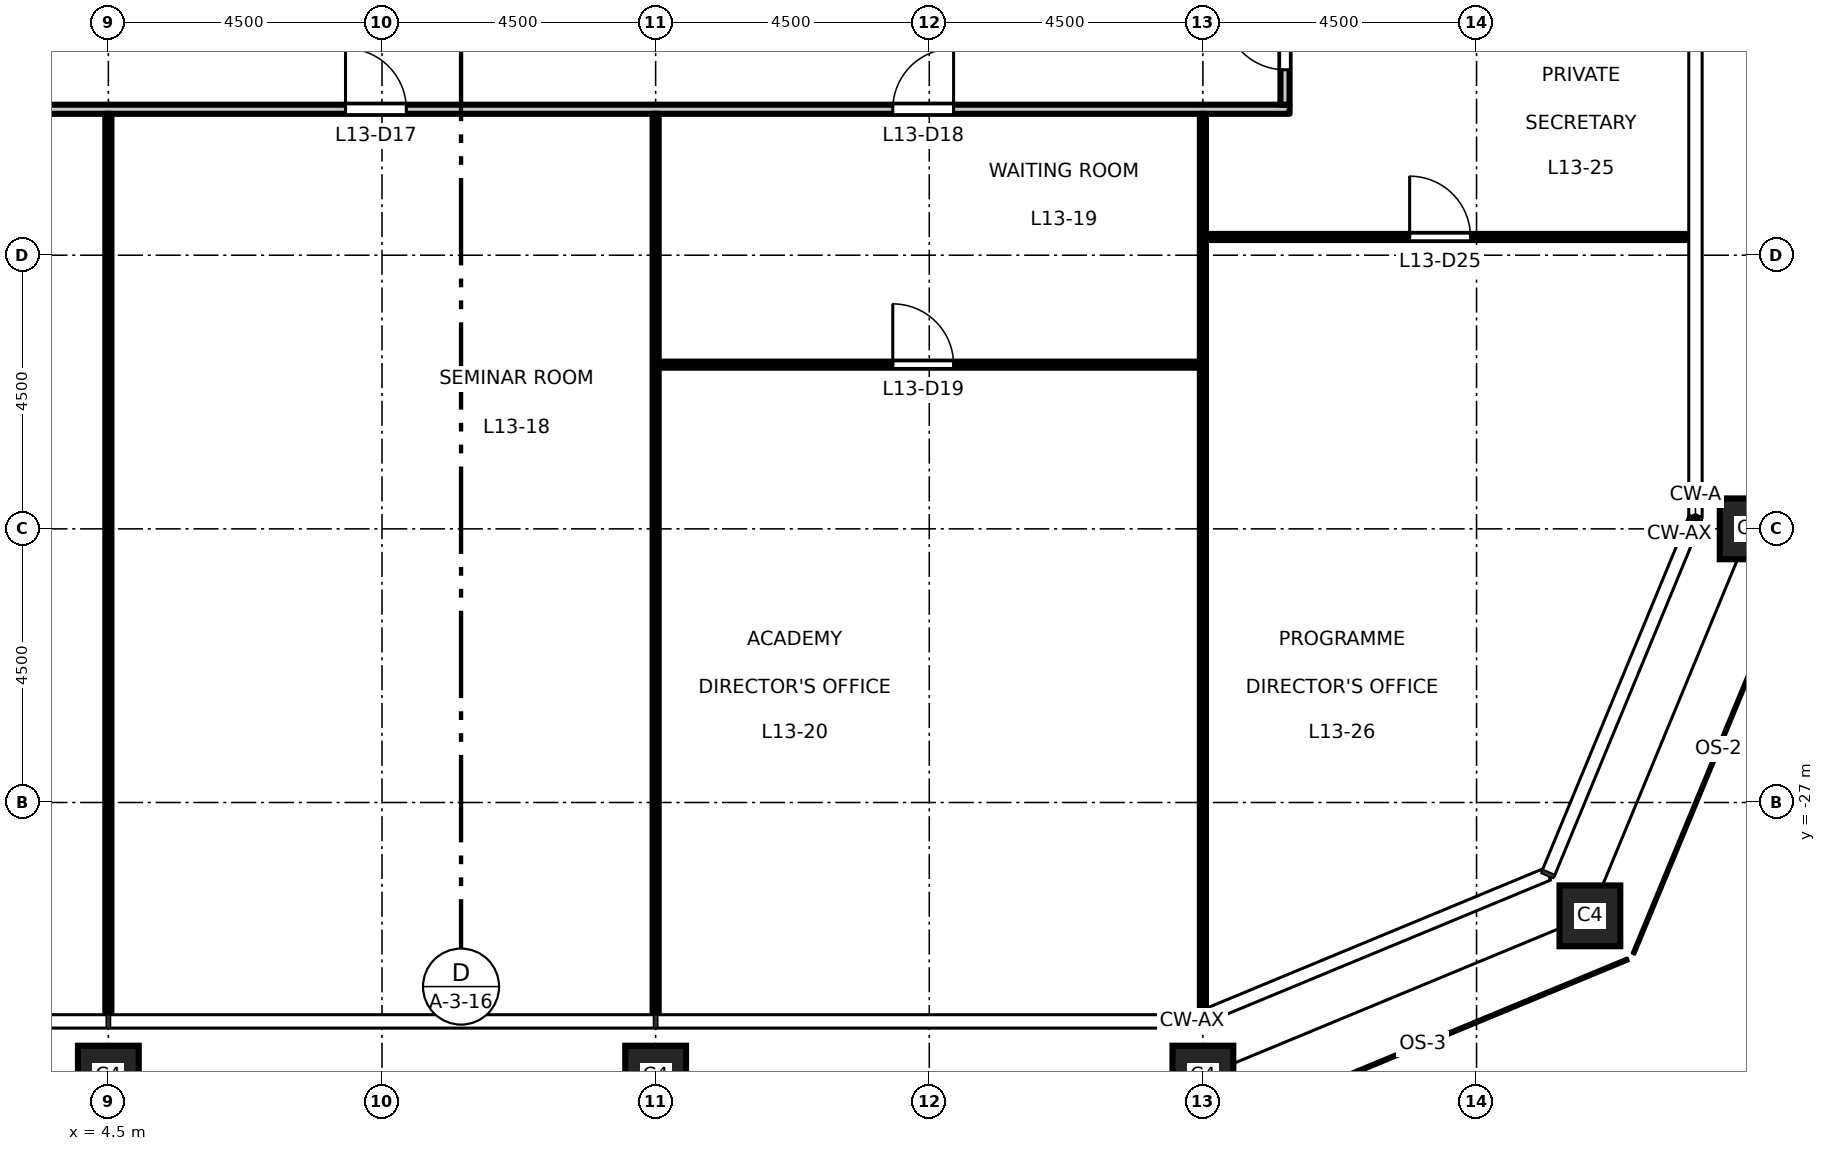
"""IFC4 building model, lengths in metres.
Left out: names, types, materials, properties, quantities, classifications, styles, units other than length and angle.
Written with IfcOpenShell. Run it as: python <this file> out.ifc"""

import sys

from ifc_helpers import new_model, si_unit, direction, frame, frame_2d, origin, origin_2d, place, context, subcontext, project, spatial, rectangle, hollow_rectangle, extrude, element, fill, save


model = new_model("IFC4")
c1 = context("Model", 3, precision=1e-05, world=origin(), true_north=direction((0.0, 1.0)))
c2 = subcontext(c1, "Body", "Model", "MODEL_VIEW")
j1 = project(units=[si_unit("LENGTHUNIT", "METRE"), si_unit("PLANEANGLEUNIT", "RADIAN")], contexts=[c1])
p1 = place(None, origin())
s1 = spatial("IfcSite", under=j1, at=p1, CompositionType="ELEMENT")
p2 = place(p1, origin())
s2 = spatial("IfcBuilding", under=s1, at=p2, CompositionType="ELEMENT")
p3 = place(p2, frame((0.0, 0.0, 62.7)))
s3 = spatial("IfcBuildingStorey", under=s2, at=p3, CompositionType="ELEMENT", Elevation=62.7)
for number, where, z_axis, x_axis in (
    (1, (4.5, -31.5, 0.0), (0.0, 0.0, 1.0), (1.0, 0.0, 0.0)),
    (2, (13.5, -31.5, 0.0), (0.0, 0.0, 1.0), (1.0, 0.0, 0.0)),
    (3, (22.5, -31.5, 0.0), (0.0, 0.0, 1.0), (1.0, 0.0, 0.0)),
    (4, (28.864, -28.864, 0.0), (0.0, 0.0, 1.0), (1.0, 0.0, 0.0)),
    (5, (31.5, -22.5, 0.0), (0.0, 0.0, 1.0), (1.0, 0.0, 0.0)),
):
    element("IfcColumn", number, at=place(p3, frame(where, z_axis=z_axis, x_axis=x_axis)), inside=s3, PredefinedType="COLUMN", context=c2, shape_type="SweptSolid", body=[
        extrude(hollow_rectangle(XDim=1.0, YDim=1.0, WallThickness=0.06, at=origin_2d()), origin(), (0.0, 0.0, 1.0), 4.5),
    ])
p4 = place(p3, frame((13.55, -19.8, 0.0), z_axis=(0.0, 0.0, 1.0), x_axis=(1.0, 0.0, 0.0)))
e6 = element("IfcWall", 6, at=p4, inside=s3, PredefinedType="PARTITIONING", context=c2, shape_type="SweptSolid", body=[
    extrude(rectangle(XDim=8.9, YDim=0.1, at=frame_2d((4.45, 0.0))), origin(), (0.0, 0.0, 1.0), 4.35),
])
p5 = place(p4, frame((3.85, 0.0, 0.0)))
e7 = element("IfcOpeningElement", 7, at=p5, cuts=e6, PredefinedType="OPENING", context=c2, shape_type="SweptSolid", body=[
    extrude(rectangle(XDim=1.0, YDim=2.1, at=frame_2d((0.5, 1.05))), frame((0.0, 0.06, 0.0), z_axis=(0.0, -1.0, 0.0), x_axis=(1.0, 0.0, 0.0)), (0.0, 0.0, 1.0), 0.12),
])
p6 = place(p3, frame((22.55, -17.7, 0.0), z_axis=(0.0, 0.0, 1.0), x_axis=(1.0, 0.0, 0.0)))
e8 = element("IfcWall", 8, at=p6, inside=s3, PredefinedType="PARTITIONING", context=c2, shape_type="SweptSolid", body=[
    extrude(rectangle(XDim=7.96, YDim=0.1, at=frame_2d((3.98, 0.0))), origin(), (0.0, 0.0, 1.0), 4.35),
])
p7 = place(p6, frame((3.35, 0.0, 0.0)))
e9 = element("IfcOpeningElement", 9, at=p7, cuts=e8, PredefinedType="OPENING", context=c2, shape_type="SweptSolid", body=[
    extrude(rectangle(XDim=1.0, YDim=2.1, at=frame_2d((0.5, 1.05))), frame((0.0, 0.06, 0.0), z_axis=(0.0, -1.0, 0.0), x_axis=(1.0, 0.0, 0.0)), (0.0, 0.0, 1.0), 0.12),
])
p8 = place(p3, frame((-23.925, -15.6, 0.0), z_axis=(0.0, 0.0, 1.0), x_axis=(1.0, 0.0, 0.0)))
e10 = element("IfcWall", 10, at=p8, inside=s3, PredefinedType="PARTITIONING", context=c2, shape_type="SweptSolid", body=[
    extrude(rectangle(XDim=47.85, YDim=0.15, at=frame_2d((23.925, 0.0))), origin(), (0.0, 0.0, 1.0), 4.35),
])
p9 = place(p8, frame((5.325, 0.0, 0.0)))
e11 = element("IfcOpeningElement", 11, at=p9, cuts=e10, PredefinedType="OPENING", context=c2, shape_type="SweptSolid", body=[
    extrude(rectangle(XDim=1.0, YDim=2.1, at=frame_2d((0.5, 1.05))), frame((0.0, 0.085, 0.0), z_axis=(0.0, -1.0, 0.0), x_axis=(1.0, 0.0, 0.0)), (0.0, 0.0, 1.0), 0.17),
])
p10 = place(p8, frame((14.325, 0.0, 0.0)))
e12 = element("IfcOpeningElement", 12, at=p10, cuts=e10, PredefinedType="OPENING", context=c2, shape_type="SweptSolid", body=[
    extrude(rectangle(XDim=1.0, YDim=2.1, at=frame_2d((0.5, 1.05))), frame((0.0, 0.085, 0.0), z_axis=(0.0, -1.0, 0.0), x_axis=(1.0, 0.0, 0.0)), (0.0, 0.0, 1.0), 0.17),
])
p11 = place(p8, frame((23.325, 0.0, 0.0)))
e13 = element("IfcOpeningElement", 13, at=p11, cuts=e10, PredefinedType="OPENING", context=c2, shape_type="SweptSolid", body=[
    extrude(rectangle(XDim=1.0, YDim=2.1, at=frame_2d((0.5, 1.05))), frame((0.0, 0.085, 0.0), z_axis=(0.0, -1.0, 0.0), x_axis=(1.0, 0.0, 0.0)), (0.0, 0.0, 1.0), 0.17),
])
p12 = place(p8, frame((32.325, 0.0, 0.0)))
e14 = element("IfcOpeningElement", 14, at=p12, cuts=e10, PredefinedType="OPENING", context=c2, shape_type="SweptSolid", body=[
    extrude(rectangle(XDim=1.0, YDim=2.1, at=frame_2d((0.5, 1.05))), frame((0.0, 0.085, 0.0), z_axis=(0.0, -1.0, 0.0), x_axis=(1.0, 0.0, 0.0)), (0.0, 0.0, 1.0), 0.17),
])
p13 = place(p8, frame((41.325, 0.0, 0.0)))
e15 = element("IfcOpeningElement", 15, at=p13, cuts=e10, PredefinedType="OPENING", context=c2, shape_type="SweptSolid", body=[
    extrude(rectangle(XDim=1.0, YDim=2.1, at=frame_2d((0.5, 1.05))), frame((0.0, 0.085, 0.0), z_axis=(0.0, -1.0, 0.0), x_axis=(1.0, 0.0, 0.0)), (0.0, 0.0, 1.0), 0.17),
])
for number, where, z_axis, x_axis in (
    (16, (4.5, -30.51, 0.0), (0.0, 0.0, 1.0), (0.0, 1.0, 0.0)),
    (17, (13.5, -30.51, 0.0), (0.0, 0.0, 1.0), (0.0, 1.0, 0.0)),
):
    element("IfcWall", number, at=place(p3, frame(where, z_axis=z_axis, x_axis=x_axis)), inside=s3, PredefinedType="PARTITIONING", context=c2, shape_type="SweptSolid", body=[
        extrude(rectangle(XDim=14.835, YDim=0.1, at=frame_2d((7.417, 0.0))), origin(), (0.0, 0.0, 1.0), 3.35),
    ])
p14 = place(p3, frame((22.5, -30.428, 0.0), z_axis=(0.0, 0.0, 1.0), x_axis=(0.0, 1.0, 0.0)))
e18 = element("IfcWall", 18, at=p14, inside=s3, PredefinedType="PARTITIONING", context=c2, shape_type="SweptSolid", body=[
    extrude(rectangle(XDim=14.753, YDim=0.1, at=frame_2d((7.376, 0.0))), origin(), (0.0, 0.0, 1.0), 3.35),
])
p15 = place(p3, frame((23.85, -15.525, 0.0), z_axis=(0.0, 0.0, 1.0), x_axis=(0.0, 1.0, 0.0)))
e19 = element("IfcWall", 19, at=p15, inside=s3, PredefinedType="PARTITIONING", context=c2, shape_type="SweptSolid", body=[
    extrude(rectangle(XDim=31.05, YDim=0.15, at=frame_2d((15.525, 0.0))), origin(), (0.0, 0.0, 1.0), 4.35),
])
p16 = place(p15, frame((29.675, 0.0, 0.0)))
e20 = element("IfcOpeningElement", 20, at=p16, cuts=e19, PredefinedType="OPENING", context=c2, shape_type="SweptSolid", body=[
    extrude(rectangle(XDim=1.0, YDim=2.1, at=frame_2d((0.5, 1.05))), frame((0.0, 0.085, 0.0), z_axis=(0.0, -1.0, 0.0), x_axis=(1.0, 0.0, 0.0)), (0.0, 0.0, 1.0), 0.17),
])
p17 = place(p15, frame((0.575, 0.0, 0.0)))
e21 = element("IfcOpeningElement", 21, at=p17, cuts=e19, PredefinedType="OPENING", context=c2, shape_type="SweptSolid", body=[
    extrude(rectangle(XDim=1.0, YDim=2.1, at=frame_2d((0.5, 1.05))), frame((0.0, 0.085, 0.0), z_axis=(0.0, -1.0, 0.0), x_axis=(1.0, 0.0, 0.0)), (0.0, 0.0, 1.0), 0.17),
])
p18 = place(p15, frame((5.925, 0.0, 0.0)))
e22 = element("IfcOpeningElement", 22, at=p18, cuts=e19, PredefinedType="OPENING", context=c2, shape_type="SweptSolid", body=[
    extrude(rectangle(XDim=1.0, YDim=2.1, at=frame_2d((0.5, 1.05))), frame((0.0, 0.085, 0.0), z_axis=(0.0, -1.0, 0.0), x_axis=(1.0, 0.0, 0.0)), (0.0, 0.0, 1.0), 0.17),
])
p19 = place(p15, frame((14.925, 0.0, 0.0)))
e23 = element("IfcOpeningElement", 23, at=p19, cuts=e19, PredefinedType="OPENING", context=c2, shape_type="SweptSolid", body=[
    extrude(rectangle(XDim=1.0, YDim=2.1, at=frame_2d((0.5, 1.05))), frame((0.0, 0.085, 0.0), z_axis=(0.0, -1.0, 0.0), x_axis=(1.0, 0.0, 0.0)), (0.0, 0.0, 1.0), 0.17),
])
p20 = place(p15, frame((23.925, 0.0, 0.0)))
e24 = element("IfcOpeningElement", 24, at=p20, cuts=e19, PredefinedType="OPENING", context=c2, shape_type="SweptSolid", body=[
    extrude(rectangle(XDim=1.0, YDim=2.1, at=frame_2d((0.5, 1.05))), frame((0.0, 0.085, 0.0), z_axis=(0.0, -1.0, 0.0), x_axis=(1.0, 0.0, 0.0)), (0.0, 0.0, 1.0), 0.17),
])
p21 = place(p12, origin())
e25 = element("IfcDoor", 25, at=p21, inside=s3, OperationType="SINGLE_SWING_LEFT", PredefinedType="DOOR", context=c2, shape_type="SweptSolid", body=[
    extrude(rectangle(XDim=1.0, YDim=2.1, at=frame_2d((0.5, 1.05))), frame((0.0, 0.025, 0.0), z_axis=(0.0, -1.0, 0.0), x_axis=(1.0, 0.0, 0.0)), (0.0, 0.0, 1.0), 0.05),
])
fill(e14, e25)
p22 = place(p13, origin())
e26 = element("IfcDoor", 26, at=p22, inside=s3, OperationType="SINGLE_SWING_RIGHT", PredefinedType="DOOR", context=c2, shape_type="SweptSolid", body=[
    extrude(rectangle(XDim=1.0, YDim=2.1, at=frame_2d((0.5, 1.05))), frame((0.0, 0.025, 0.0), z_axis=(0.0, -1.0, 0.0), x_axis=(1.0, 0.0, 0.0)), (0.0, 0.0, 1.0), 0.05),
])
fill(e15, e26)
p23 = place(p5, origin())
e27 = element("IfcDoor", 27, at=p23, inside=s3, OperationType="SINGLE_SWING_LEFT", PredefinedType="DOOR", context=c2, shape_type="SweptSolid", body=[
    extrude(rectangle(XDim=1.0, YDim=2.1, at=frame_2d((0.5, 1.05))), frame((0.0, 0.025, 0.0), z_axis=(0.0, -1.0, 0.0), x_axis=(1.0, 0.0, 0.0)), (0.0, 0.0, 1.0), 0.05),
])
fill(e7, e27)
p24 = place(p17, origin())
e28 = element("IfcDoor", 28, at=p24, inside=s3, OperationType="SINGLE_SWING_RIGHT", PredefinedType="DOOR", context=c2, shape_type="SweptSolid", body=[
    extrude(rectangle(XDim=1.0, YDim=2.1, at=frame_2d((0.5, 1.05))), frame((0.0, 0.025, 0.0), z_axis=(0.0, -1.0, 0.0), x_axis=(1.0, 0.0, 0.0)), (0.0, 0.0, 1.0), 0.05),
])
fill(e21, e28)
p25 = place(p7, origin())
e29 = element("IfcDoor", 29, at=p25, inside=s3, OperationType="SINGLE_SWING_LEFT", PredefinedType="DOOR", context=c2, shape_type="SweptSolid", body=[
    extrude(rectangle(XDim=1.0, YDim=2.1, at=frame_2d((0.5, 1.05))), frame((0.0, 0.025, 0.0), z_axis=(0.0, -1.0, 0.0), x_axis=(1.0, 0.0, 0.0)), (0.0, 0.0, 1.0), 0.05),
])
fill(e9, e29)
save(model, sys.argv[1])
